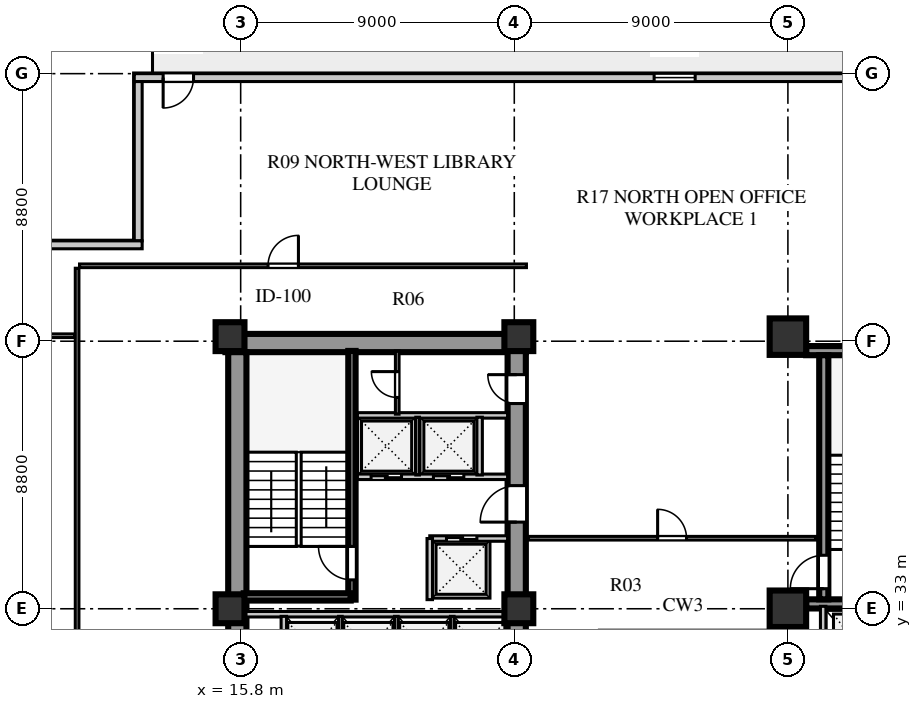
"""IFC4 building model, lengths in metres.
Left out: names, types, materials, properties, quantities, classifications, styles, units other than length and angle.
Written with IfcOpenShell. Run it as: python <this file> out.ifc"""

import sys

from ifc_helpers import new_model, si_unit, direction, frame, frame_2d, origin, origin_2d, place, context, subcontext, project, spatial, rectangle, extrude, element, fill, save


model = new_model("IFC4")
c1 = context("Model", 3, precision=1e-05, world=origin(), true_north=direction((0.0, 1.0)))
c2 = subcontext(c1, "Body", "Model", "MODEL_VIEW")
j1 = project(units=[si_unit("LENGTHUNIT", "METRE"), si_unit("PLANEANGLEUNIT", "RADIAN")], contexts=[c1])
p1 = place(None, origin())
s1 = spatial("IfcSite", under=j1, at=p1, CompositionType="ELEMENT")
p2 = place(p1, origin())
s2 = spatial("IfcBuilding", under=s1, at=p2, CompositionType="ELEMENT")
p3 = place(p2, frame((0.0, 0.0, 26.0)))
s3 = spatial("IfcBuildingStorey", under=s2, at=p3, CompositionType="ELEMENT", Elevation=26.0)
p4 = place(p3, frame((15.3, 41.74, 0.0), z_axis=(0.0, 0.0, 1.0), x_axis=(1.0, 0.0, 0.0)))
e1 = element("IfcWall", 1, at=p4, inside=s3, PredefinedType="SHEAR", context=c2, shape_type="SweptSolid", body=[
    extrude(rectangle(XDim=9.88, YDim=0.6, at=frame_2d((4.94, 0.0))), origin(), (0.0, 0.0, 1.0), 3.72),
])
p5 = place(p3, frame((15.69, 15.81, 0.0), z_axis=(0.0, 0.0, 1.0), x_axis=(0.0, 1.0, 0.0)))
e2 = element("IfcWall", 2, at=p5, inside=s3, PredefinedType="SHEAR", context=c2, shape_type="SweptSolid", body=[
    extrude(rectangle(XDim=25.63, YDim=0.6, at=frame_2d((12.815, 0.0))), origin(), (0.0, 0.0, 1.0), 3.72),
])
p6 = place(p3, frame((24.88, 15.74, 0.0), z_axis=(0.0, 0.0, 1.0), x_axis=(0.0, 1.0, 0.0)))
e3 = element("IfcWall", 3, at=p6, inside=s3, PredefinedType="SHEAR", context=c2, shape_type="SweptSolid", body=[
    extrude(rectangle(XDim=25.76, YDim=0.6, at=frame_2d((12.88, 0.0))), origin(), (0.0, 0.0, 1.0), 3.72),
])
p7 = place(p6, frame((1.61, 0.0, 0.0)))
e4 = element("IfcOpeningElement", 4, at=p7, cuts=e3, PredefinedType="OPENING", context=c2, shape_type="SweptSolid", body=[
    extrude(rectangle(XDim=1.2, YDim=2.1, at=frame_2d((0.6, 1.05))), frame((0.0, 0.31, 0.0), z_axis=(0.0, -1.0, 0.0), x_axis=(1.0, 0.0, 0.0)), (0.0, 0.0, 1.0), 0.62),
])
p8 = place(p6, frame((6.78, 0.0, 0.0)))
e5 = element("IfcOpeningElement", 5, at=p8, cuts=e3, PredefinedType="OPENING", context=c2, shape_type="SweptSolid", body=[
    extrude(rectangle(XDim=0.85, YDim=2.06, at=frame_2d((0.425, 1.03))), frame((0.0, 0.31, 0.0), z_axis=(0.0, -1.0, 0.0), x_axis=(1.0, 0.0, 0.0)), (0.0, 0.0, 1.0), 0.62),
])
p9 = place(p6, frame((12.11, 0.0, 0.0)))
e6 = element("IfcOpeningElement", 6, at=p9, cuts=e3, PredefinedType="OPENING", context=c2, shape_type="SweptSolid", body=[
    extrude(rectangle(XDim=1.5, YDim=2.12, at=frame_2d((0.75, 1.06))), frame((0.0, 0.31, 0.0), z_axis=(0.0, -1.0, 0.0), x_axis=(1.0, 0.0, 0.0)), (0.0, 0.0, 1.0), 0.62),
])
p10 = place(p6, frame((20.11, 0.0, 0.0)))
e7 = element("IfcOpeningElement", 7, at=p10, cuts=e3, PredefinedType="OPENING", context=c2, shape_type="SweptSolid", body=[
    extrude(rectangle(XDim=1.2, YDim=2.12, at=frame_2d((0.6, 1.06))), frame((0.0, 0.31, 0.0), z_axis=(0.0, -1.0, 0.0), x_axis=(1.0, 0.0, 0.0)), (0.0, 0.0, 1.0), 0.62),
])
p11 = place(p6, frame((24.01, 0.0, 0.0)))
e8 = element("IfcOpeningElement", 8, at=p11, cuts=e3, PredefinedType="OPENING", context=c2, shape_type="SweptSolid", body=[
    extrude(rectangle(XDim=0.95, YDim=2.1, at=frame_2d((0.475, 1.05))), frame((0.0, 0.31, 0.0), z_axis=(0.0, -1.0, 0.0), x_axis=(1.0, 0.0, 0.0)), (0.0, 0.0, 1.0), 0.62),
])
for number, where, z_axis, x_axis in (
    (9, (34.4, 33.16, 0.0), (0.0, 0.0, 1.0), (1.0, 0.0, 0.0)),
    (10, (34.4, 41.49, 0.0), (0.0, 0.0, 1.0), (1.0, 0.0, 0.0)),
):
    element("IfcWall", number, at=place(p3, frame(where, z_axis=z_axis, x_axis=x_axis)), inside=s3, PredefinedType="SHEAR", context=c2, shape_type="SweptSolid", body=[
        extrude(rectangle(XDim=4.47, YDim=0.3, at=frame_2d((2.235, 0.0))), origin(), (0.0, 0.0, 1.0), 3.72),
    ])
p12 = place(p3, frame((34.98, 33.31, 0.0), z_axis=(0.0, 0.0, 1.0), x_axis=(0.0, 1.0, 0.0)))
e11 = element("IfcWall", 11, at=p12, inside=s3, PredefinedType="SHEAR", context=c2, shape_type="SweptSolid", body=[
    extrude(rectangle(XDim=8.03, YDim=0.3, at=frame_2d((4.015, 0.0))), origin(), (0.0, 0.0, 1.0), 3.72),
])
p13 = place(p12, frame((0.35, 0.0, 0.0)))
e12 = element("IfcOpeningElement", 12, at=p13, cuts=e11, PredefinedType="OPENING", context=c2, shape_type="SweptSolid", body=[
    extrude(rectangle(XDim=1.1, YDim=2.1, at=frame_2d((0.55, 1.05))), frame((0.0, 0.16, 0.0), z_axis=(0.0, -1.0, 0.0), x_axis=(1.0, 0.0, 0.0)), (0.0, 0.0, 1.0), 0.32),
])
for number, where, z_axis, x_axis in (
    (13, (15.45, 33.0, 0.0), (0.0, 0.0, 1.0), (1.0, 0.0, 0.0)),
    (14, (15.45, 41.95, 0.0), (0.0, 0.0, 1.0), (1.0, 0.0, 0.0)),
    (15, (24.95, 33.0, 0.0), (0.0, 0.0, 1.0), (1.0, 0.0, 0.0)),
    (16, (24.95, 41.95, 0.0), (0.0, 0.0, 1.0), (1.0, 0.0, 0.0)),
):
    element("IfcColumn", number, at=place(p3, frame(where, z_axis=z_axis, x_axis=x_axis)), inside=s3, PredefinedType="COLUMN", context=c2, shape_type="SweptSolid", body=[
        extrude(rectangle(XDim=0.95, YDim=0.95, at=origin_2d()), origin(), (0.0, 0.0, 1.0), 3.72),
    ])
for number, where, z_axis, x_axis in (
    (17, (33.8, 33.0, 0.0), (0.0, 0.0, 1.0), (1.0, 0.0, 0.0)),
    (18, (33.8, 41.95, 0.0), (0.0, 0.0, 1.0), (1.0, 0.0, 0.0)),
):
    element("IfcColumn", number, at=place(p3, frame(where, z_axis=z_axis, x_axis=x_axis)), inside=s3, PredefinedType="COLUMN", context=c2, shape_type="SweptSolid", body=[
        extrude(rectangle(XDim=1.2, YDim=1.2, at=origin_2d()), origin(), (0.0, 0.0, 1.0), 3.72),
    ])
p14 = place(p3, frame((46.3, 50.47, 0.0), z_axis=(0.0, 0.0, 1.0), x_axis=(-1.0, 0.0, 0.0)))
e19 = element("IfcWall", 19, at=p14, inside=s3, PredefinedType="SOLIDWALL", context=c2, shape_type="SweptSolid", body=[
    extrude(rectangle(XDim=34.0, YDim=0.26, at=frame_2d((17.0, 0.0))), origin(), (0.0, 0.0, 1.0), 3.72),
])
p15 = place(p14, frame((32.05, 0.0, 0.0)))
e20 = element("IfcOpeningElement", 20, at=p15, cuts=e19, PredefinedType="OPENING", context=c2, shape_type="SweptSolid", body=[
    extrude(rectangle(XDim=1.0, YDim=2.05, at=frame_2d((0.5, 1.025))), frame((0.0, 0.14, 0.0), z_axis=(0.0, -1.0, 0.0), x_axis=(1.0, 0.0, 0.0)), (0.0, 0.0, 1.0), 0.28),
])
p16 = place(p14, frame((15.55, 0.0, 0.8)))
e21 = element("IfcOpeningElement", 21, at=p16, cuts=e19, PredefinedType="OPENING", context=c2, shape_type="SweptSolid", body=[
    extrude(rectangle(XDim=1.35, YDim=1.9, at=frame_2d((0.675, 0.95))), frame((0.0, 0.14, 0.0), z_axis=(0.0, -1.0, 0.0), x_axis=(1.0, 0.0, 0.0)), (0.0, 0.0, 1.0), 0.28),
])
p17 = place(p3, frame((12.43, 50.34, 0.0), z_axis=(0.0, 0.0, 1.0), x_axis=(0.0, -1.0, 0.0)))
e22 = element("IfcWall", 22, at=p17, inside=s3, PredefinedType="SOLIDWALL", context=c2, shape_type="SweptSolid", body=[
    extrude(rectangle(XDim=5.24, YDim=0.26, at=frame_2d((2.62, 0.0))), origin(), (0.0, 0.0, 1.0), 3.72),
])
p18 = place(p3, frame((12.56, 44.97, 0.0), z_axis=(0.0, 0.0, 1.0), x_axis=(-1.0, 0.0, 0.0)))
e23 = element("IfcWall", 23, at=p18, inside=s3, PredefinedType="SOLIDWALL", context=c2, shape_type="SweptSolid", body=[
    extrude(rectangle(XDim=5.76, YDim=0.26, at=frame_2d((2.88, 0.0))), origin(), (0.0, 0.0, 1.0), 3.72),
])
p19 = place(p3, frame((15.9, 32.82, 0.0), z_axis=(0.0, 0.0, 1.0), x_axis=(1.0, 0.0, 0.0)))
e24 = element("IfcWall", 24, at=p19, inside=s3, PredefinedType="SOLIDWALL", context=c2, shape_type="SweptSolid", body=[
    extrude(rectangle(XDim=8.68, YDim=0.18, at=frame_2d((4.34, 0.0))), origin(), (0.0, 0.0, 1.0), 3.02),
])
p20 = place(p3, frame((17.22, 30.7, 0.0), z_axis=(0.0, 0.0, 1.0), x_axis=(0.0, 1.0, 0.0)))
e25 = element("IfcWall", 25, at=p20, inside=s3, PredefinedType="SOLIDWALL", context=c2, shape_type="SweptSolid", body=[
    extrude(rectangle(XDim=2.05, YDim=0.18, at=frame_2d((1.025, 0.0))), origin(), (0.0, 0.0, 1.0), 3.72),
])
for number, where, z_axis, x_axis in (
    (26, (19.08, 30.7, 0.0), (0.0, 0.0, 1.0), (0.0, 1.0, 0.0)),
    (27, (20.92, 30.7, 0.0), (0.0, 0.0, 1.0), (0.0, 1.0, 0.0)),
    (28, (22.76, 30.7, 0.0), (0.0, 0.0, 1.0), (0.0, 1.0, 0.0)),
):
    element("IfcWall", number, at=place(p3, frame(where, z_axis=z_axis, x_axis=x_axis)), inside=s3, PredefinedType="PARTITIONING", context=c2, shape_type="SweptSolid", body=[
        extrude(rectangle(XDim=2.05, YDim=0.12, at=frame_2d((1.025, 0.0))), origin(), (0.0, 0.0, 1.0), 3.72),
    ])
p21 = place(p3, frame((19.46, 33.3, 0.0), z_axis=(0.0, 0.0, 1.0), x_axis=(0.0, 1.0, 0.0)))
e29 = element("IfcWall", 29, at=p21, inside=s3, PredefinedType="SHEAR", context=c2, shape_type="SweptSolid", body=[
    extrude(rectangle(XDim=8.18, YDim=0.24, at=frame_2d((4.09, 0.0))), origin(), (0.0, 0.0, 1.0), 4.0),
])
p22 = place(p21, frame((0.65, 0.0, 0.0)))
e30 = element("IfcOpeningElement", 30, at=p22, cuts=e29, PredefinedType="OPENING", context=c2, shape_type="SweptSolid", body=[
    extrude(rectangle(XDim=1.1, YDim=2.1, at=frame_2d((0.55, 1.05))), frame((0.0, 0.13, 0.0), z_axis=(0.0, -1.0, 0.0), x_axis=(1.0, 0.0, 0.0)), (0.0, 0.0, 1.0), 0.26),
])
p23 = place(p3, frame((15.9, 33.39, 0.0), z_axis=(0.0, 0.0, 1.0), x_axis=(1.0, 0.0, 0.0)))
e31 = element("IfcWall", 31, at=p23, inside=s3, PredefinedType="SHEAR", context=c2, shape_type="SweptSolid", body=[
    extrude(rectangle(XDim=3.52, YDim=0.24, at=frame_2d((1.76, 0.0))), origin(), (0.0, 0.0, 1.0), 4.0),
])
p24 = place(p3, frame((22.02, 35.31, 0.0), z_axis=(0.0, 0.0, 1.0), x_axis=(1.0, 0.0, 0.0)))
e32 = element("IfcWall", 32, at=p24, inside=s3, PredefinedType="SOLIDWALL", context=c2, shape_type="SweptSolid", body=[
    extrude(rectangle(XDim=2.56, YDim=0.18, at=frame_2d((1.28, 0.0))), origin(), (0.0, 0.0, 1.0), 3.72),
])
p25 = place(p24, frame((0.55, 0.0, 0.0)))
e33 = element("IfcOpeningElement", 33, at=p25, cuts=e32, PredefinedType="OPENING", context=c2, shape_type="SweptSolid", body=[
    extrude(rectangle(XDim=1.0, YDim=2.1, at=frame_2d((0.5, 1.05))), frame((0.0, 0.1, 0.0), z_axis=(0.0, -1.0, 0.0), x_axis=(1.0, 0.0, 0.0)), (0.0, 0.0, 1.0), 0.2),
])
p26 = place(p3, frame((22.02, 33.3, 0.0), z_axis=(0.0, 0.0, 1.0), x_axis=(0.0, 1.0, 0.0)))
e34 = element("IfcWall", 34, at=p26, inside=s3, PredefinedType="SOLIDWALL", context=c2, shape_type="SweptSolid", body=[
    extrude(rectangle(XDim=2.01, YDim=0.18, at=frame_2d((1.005, 0.0))), origin(), (0.0, 0.0, 1.0), 3.72),
])
p27 = place(p3, frame((19.64, 37.34, 0.0), z_axis=(0.0, 0.0, 1.0), x_axis=(1.0, 0.0, 0.0)))
e35 = element("IfcWall", 35, at=p27, inside=s3, PredefinedType="SOLIDWALL", context=c2, shape_type="SweptSolid", body=[
    extrude(rectangle(XDim=4.94, YDim=0.18, at=frame_2d((2.47, 0.0))), origin(), (0.0, 0.0, 1.0), 3.72),
])
p28 = place(p27, frame((0.45, 0.0, 0.0)))
e36 = element("IfcOpeningElement", 36, at=p28, cuts=e35, PredefinedType="OPENING", context=c2, shape_type="SweptSolid", body=[
    extrude(rectangle(XDim=1.0, YDim=2.1, at=frame_2d((0.5, 1.05))), frame((0.0, 0.1, 0.0), z_axis=(0.0, -1.0, 0.0), x_axis=(1.0, 0.0, 0.0)), (0.0, 0.0, 1.0), 0.2),
])
p29 = place(p27, frame((2.5, 0.0, 0.0)))
e37 = element("IfcOpeningElement", 37, at=p29, cuts=e35, PredefinedType="OPENING", context=c2, shape_type="SweptSolid", body=[
    extrude(rectangle(XDim=1.0, YDim=2.1, at=frame_2d((0.5, 1.05))), frame((0.0, 0.1, 0.0), z_axis=(0.0, -1.0, 0.0), x_axis=(1.0, 0.0, 0.0)), (0.0, 0.0, 1.0), 0.2),
])
p30 = place(p3, frame((19.64, 39.36, 0.0), z_axis=(0.0, 0.0, 1.0), x_axis=(1.0, 0.0, 0.0)))
e38 = element("IfcWall", 38, at=p30, inside=s3, PredefinedType="SOLIDWALL", context=c2, shape_type="SweptSolid", body=[
    extrude(rectangle(XDim=4.94, YDim=0.18, at=frame_2d((2.47, 0.0))), origin(), (0.0, 0.0, 1.0), 3.72),
])
p31 = place(p3, frame((21.62, 37.4, 0.0), z_axis=(0.0, 0.0, 1.0), x_axis=(0.0, 1.0, 0.0)))
e39 = element("IfcWall", 39, at=p31, inside=s3, PredefinedType="PARTITIONING", context=c2, shape_type="SweptSolid", body=[
    extrude(rectangle(XDim=1.9, YDim=0.12, at=frame_2d((0.95, 0.0))), origin(), (0.0, 0.0, 1.0), 3.72),
])
p32 = place(p3, frame((23.66, 37.4, 0.0), z_axis=(0.0, 0.0, 1.0), x_axis=(0.0, 1.0, 0.0)))
e40 = element("IfcWall", 40, at=p32, inside=s3, PredefinedType="SOLIDWALL", context=c2, shape_type="SweptSolid", body=[
    extrude(rectangle(XDim=1.9, YDim=0.18, at=frame_2d((0.95, 0.0))), origin(), (0.0, 0.0, 1.0), 3.72),
])
p33 = place(p3, frame((20.95, 39.4, 0.0), z_axis=(0.0, 0.0, 1.0), x_axis=(0.0, 1.0, 0.0)))
e41 = element("IfcWall", 41, at=p33, inside=s3, PredefinedType="PARTITIONING", context=c2, shape_type="SweptSolid", body=[
    extrude(rectangle(XDim=2.08, YDim=0.12, at=frame_2d((1.04, 0.0))), origin(), (0.0, 0.0, 1.0), 3.72),
])
p34 = place(p33, frame((0.55, 0.0, 0.0)))
e42 = element("IfcOpeningElement", 42, at=p34, cuts=e41, PredefinedType="OPENING", context=c2, shape_type="SweptSolid", body=[
    extrude(rectangle(XDim=0.85, YDim=2.06, at=frame_2d((0.425, 1.03))), frame((0.0, 0.07, 0.0), z_axis=(0.0, -1.0, 0.0), x_axis=(1.0, 0.0, 0.0)), (0.0, 0.0, 1.0), 0.14),
])
p35 = place(p3, frame((34.96, 28.86, 0.0), z_axis=(0.0, 0.0, 1.0), x_axis=(0.0, 1.0, 0.0)))
e43 = element("IfcWall", 43, at=p35, inside=s3, PredefinedType="SOLIDWALL", context=c2, shape_type="SweptSolid", body=[
    extrude(rectangle(XDim=4.22, YDim=0.18, at=frame_2d((2.11, 0.0))), origin(), (0.0, 0.0, 1.0), 3.72),
])
p36 = place(p3, frame((25.25, 35.32, 0.0), z_axis=(0.0, 0.0, 1.0), x_axis=(1.0, 0.0, 0.0)))
e44 = element("IfcWall", 44, at=p36, inside=s3, PredefinedType="PARTITIONING", context=c2, shape_type="SweptSolid", body=[
    extrude(rectangle(XDim=9.47, YDim=0.12, at=frame_2d((4.735, 0.0))), origin(), (0.0, 0.0, 1.0), 3.72),
])
p37 = place(p36, frame((4.265, 0.0, 0.0)))
e45 = element("IfcOpeningElement", 45, at=p37, cuts=e44, PredefinedType="OPENING", context=c2, shape_type="SweptSolid", body=[
    extrude(rectangle(XDim=0.95, YDim=2.08, at=frame_2d((0.475, 1.04))), frame((0.0, 0.07, 0.0), z_axis=(0.0, -1.0, 0.0), x_axis=(1.0, 0.0, 0.0)), (0.0, 0.0, 1.0), 0.14),
])
p38 = place(p3, frame((10.42, 13.0, 0.0), z_axis=(0.0, 0.0, 1.0), x_axis=(0.0, 1.0, 0.0)))
e46 = element("IfcWall", 46, at=p38, inside=s3, PredefinedType="PARTITIONING", context=c2, shape_type="SweptSolid", body=[
    extrude(rectangle(XDim=31.2, YDim=0.12, at=frame_2d((15.6, 0.0))), origin(), (0.0, 0.0, 1.0), 3.72),
])
p39 = place(p38, frame((15.15, 0.0, 0.0)))
e47 = element("IfcOpeningElement", 47, at=p39, cuts=e46, PredefinedType="OPENING", context=c2, shape_type="SweptSolid", body=[
    extrude(rectangle(XDim=0.95, YDim=2.08, at=frame_2d((0.475, 1.04))), frame((0.0, 0.07, 0.0), z_axis=(0.0, -1.0, 0.0), x_axis=(1.0, 0.0, 0.0)), (0.0, 0.0, 1.0), 0.14),
])
p40 = place(p3, frame((7.08, 41.98, 0.0), z_axis=(0.0, 0.0, 1.0), x_axis=(1.0, 0.0, 0.0)))
e48 = element("IfcWall", 48, at=p40, inside=s3, PredefinedType="PARTITIONING", context=c2, shape_type="SweptSolid", body=[
    extrude(rectangle(XDim=3.26, YDim=0.12, at=frame_2d((1.63, 0.0))), origin(), (0.0, 0.0, 1.0), 3.22),
])
p41 = place(p3, frame((10.5, 44.28, 0.0), z_axis=(0.0, 0.0, 1.0), x_axis=(1.0, 0.0, 0.0)))
e49 = element("IfcWall", 49, at=p41, inside=s3, PredefinedType="PARTITIONING", context=c2, shape_type="SweptSolid", body=[
    extrude(rectangle(XDim=14.7, YDim=0.12, at=frame_2d((7.35, 0.0))), origin(), (0.0, 0.0, 1.0), 3.72),
])
p42 = place(p41, frame((6.2, 0.0, 0.0)))
e50 = element("IfcOpeningElement", 50, at=p42, cuts=e49, PredefinedType="OPENING", context=c2, shape_type="SweptSolid", body=[
    extrude(rectangle(XDim=1.0, YDim=2.08, at=frame_2d((0.5, 1.04))), frame((0.0, 0.07, 0.0), z_axis=(0.0, -1.0, 0.0), x_axis=(1.0, 0.0, 0.0)), (0.0, 0.0, 1.0), 0.14),
])
p43 = place(p15, frame((1.0, 0.0, 0.0), z_axis=(0.0, 0.0, 1.0), x_axis=(-1.0, 0.0, 0.0)))
e51 = element("IfcDoor", 51, at=p43, inside=s3, OperationType="SINGLE_SWING_LEFT", PredefinedType="DOOR", context=c2, shape_type="SweptSolid", body=[
    extrude(rectangle(XDim=1.0, YDim=2.05, at=frame_2d((0.5, 1.025))), frame((0.0, 0.025, 0.0), z_axis=(0.0, -1.0, 0.0), x_axis=(1.0, 0.0, 0.0)), (0.0, 0.0, 1.0), 0.05),
])
fill(e20, e51)
p44 = place(p16, origin())
e52 = element("IfcWindow", 52, at=p44, inside=s3, PartitioningType="SINGLE_PANEL", PredefinedType="WINDOW", context=c2, shape_type="SweptSolid", body=[
    extrude(rectangle(XDim=1.35, YDim=1.9, at=frame_2d((0.675, 0.95))), frame((0.0, 0.03, 0.0), z_axis=(0.0, -1.0, 0.0), x_axis=(1.0, 0.0, 0.0)), (0.0, 0.0, 1.0), 0.06),
])
fill(e21, e52)
p45 = place(p22, origin())
e53 = element("IfcDoor", 53, at=p45, inside=s3, OperationType="SINGLE_SWING_RIGHT", PredefinedType="DOOR", context=c2, shape_type="SweptSolid", body=[
    extrude(rectangle(XDim=1.1, YDim=2.1, at=frame_2d((0.55, 1.05))), frame((0.0, 0.025, 0.0), z_axis=(0.0, -1.0, 0.0), x_axis=(1.0, 0.0, 0.0)), (0.0, 0.0, 1.0), 0.05),
])
fill(e30, e53)
p46 = place(p10, frame((1.2, 0.0, 0.0), z_axis=(0.0, 0.0, 1.0), x_axis=(-1.0, 0.0, 0.0)))
e54 = element("IfcDoor", 54, at=p46, inside=s3, OperationType="SINGLE_SWING_RIGHT", PredefinedType="DOOR", context=c2, shape_type="SweptSolid", body=[
    extrude(rectangle(XDim=1.2, YDim=2.12, at=frame_2d((0.6, 1.06))), frame((0.0, 0.025, 0.0), z_axis=(0.0, -1.0, 0.0), x_axis=(1.0, 0.0, 0.0)), (0.0, 0.0, 1.0), 0.05),
])
fill(e7, e54)
p47 = place(p28, frame((1.0, 0.0, 0.0), z_axis=(0.0, 0.0, 1.0), x_axis=(-1.0, 0.0, 0.0)))
e55 = element("IfcDoor", 55, at=p47, inside=s3, OperationType="DOUBLE_DOOR_SLIDING", PredefinedType="DOOR", context=c2, shape_type="SweptSolid", body=[
    extrude(rectangle(XDim=1.0, YDim=2.1, at=frame_2d((0.5, 1.05))), frame((0.0, 0.025, 0.0), z_axis=(0.0, -1.0, 0.0), x_axis=(1.0, 0.0, 0.0)), (0.0, 0.0, 1.0), 0.05),
])
fill(e36, e55)
p48 = place(p29, frame((1.0, 0.0, 0.0), z_axis=(0.0, 0.0, 1.0), x_axis=(-1.0, 0.0, 0.0)))
e56 = element("IfcDoor", 56, at=p48, inside=s3, OperationType="DOUBLE_DOOR_SLIDING", PredefinedType="DOOR", context=c2, shape_type="SweptSolid", body=[
    extrude(rectangle(XDim=1.0, YDim=2.1, at=frame_2d((0.5, 1.05))), frame((0.0, 0.025, 0.0), z_axis=(0.0, -1.0, 0.0), x_axis=(1.0, 0.0, 0.0)), (0.0, 0.0, 1.0), 0.05),
])
fill(e37, e56)
p49 = place(p25, origin())
e57 = element("IfcDoor", 57, at=p49, inside=s3, OperationType="DOUBLE_DOOR_SLIDING", PredefinedType="DOOR", context=c2, shape_type="SweptSolid", body=[
    extrude(rectangle(XDim=1.0, YDim=2.1, at=frame_2d((0.5, 1.05))), frame((0.0, 0.025, 0.0), z_axis=(0.0, -1.0, 0.0), x_axis=(1.0, 0.0, 0.0)), (0.0, 0.0, 1.0), 0.05),
])
fill(e33, e57)
p50 = place(p34, origin())
e58 = element("IfcDoor", 58, at=p50, inside=s3, OperationType="SINGLE_SWING_RIGHT", PredefinedType="DOOR", context=c2, shape_type="SweptSolid", body=[
    extrude(rectangle(XDim=0.85, YDim=2.06, at=frame_2d((0.425, 1.03))), frame((0.0, 0.025, 0.0), z_axis=(0.0, -1.0, 0.0), x_axis=(1.0, 0.0, 0.0)), (0.0, 0.0, 1.0), 0.05),
])
fill(e42, e58)
p51 = place(p11, frame((0.95, 0.0, 0.0), z_axis=(0.0, 0.0, 1.0), x_axis=(-1.0, 0.0, 0.0)))
e59 = element("IfcDoor", 59, at=p51, inside=s3, OperationType="SINGLE_SWING_LEFT", PredefinedType="DOOR", context=c2, shape_type="SweptSolid", body=[
    extrude(rectangle(XDim=0.95, YDim=2.1, at=frame_2d((0.475, 1.05))), frame((0.0, 0.025, 0.0), z_axis=(0.0, -1.0, 0.0), x_axis=(1.0, 0.0, 0.0)), (0.0, 0.0, 1.0), 0.05),
])
fill(e8, e59)
p52 = place(p13, origin())
e60 = element("IfcDoor", 60, at=p52, inside=s3, OperationType="SINGLE_SWING_LEFT", PredefinedType="DOOR", context=c2, shape_type="SweptSolid", body=[
    extrude(rectangle(XDim=1.1, YDim=2.1, at=frame_2d((0.55, 1.05))), frame((0.0, 0.025, 0.0), z_axis=(0.0, -1.0, 0.0), x_axis=(1.0, 0.0, 0.0)), (0.0, 0.0, 1.0), 0.05),
])
fill(e12, e60)
p53 = place(p42, origin())
e61 = element("IfcDoor", 61, at=p53, inside=s3, OperationType="SINGLE_SWING_RIGHT", PredefinedType="DOOR", context=c2, shape_type="SweptSolid", body=[
    extrude(rectangle(XDim=1.0, YDim=2.08, at=frame_2d((0.5, 1.04))), frame((0.0, 0.025, 0.0), z_axis=(0.0, -1.0, 0.0), x_axis=(1.0, 0.0, 0.0)), (0.0, 0.0, 1.0), 0.05),
])
fill(e50, e61)
p54 = place(p37, origin())
e62 = element("IfcDoor", 62, at=p54, inside=s3, OperationType="SINGLE_SWING_LEFT", PredefinedType="DOOR", context=c2, shape_type="SweptSolid", body=[
    extrude(rectangle(XDim=0.95, YDim=2.08, at=frame_2d((0.475, 1.04))), frame((0.0, 0.025, 0.0), z_axis=(0.0, -1.0, 0.0), x_axis=(1.0, 0.0, 0.0)), (0.0, 0.0, 1.0), 0.05),
])
fill(e45, e62)
save(model, sys.argv[1])
